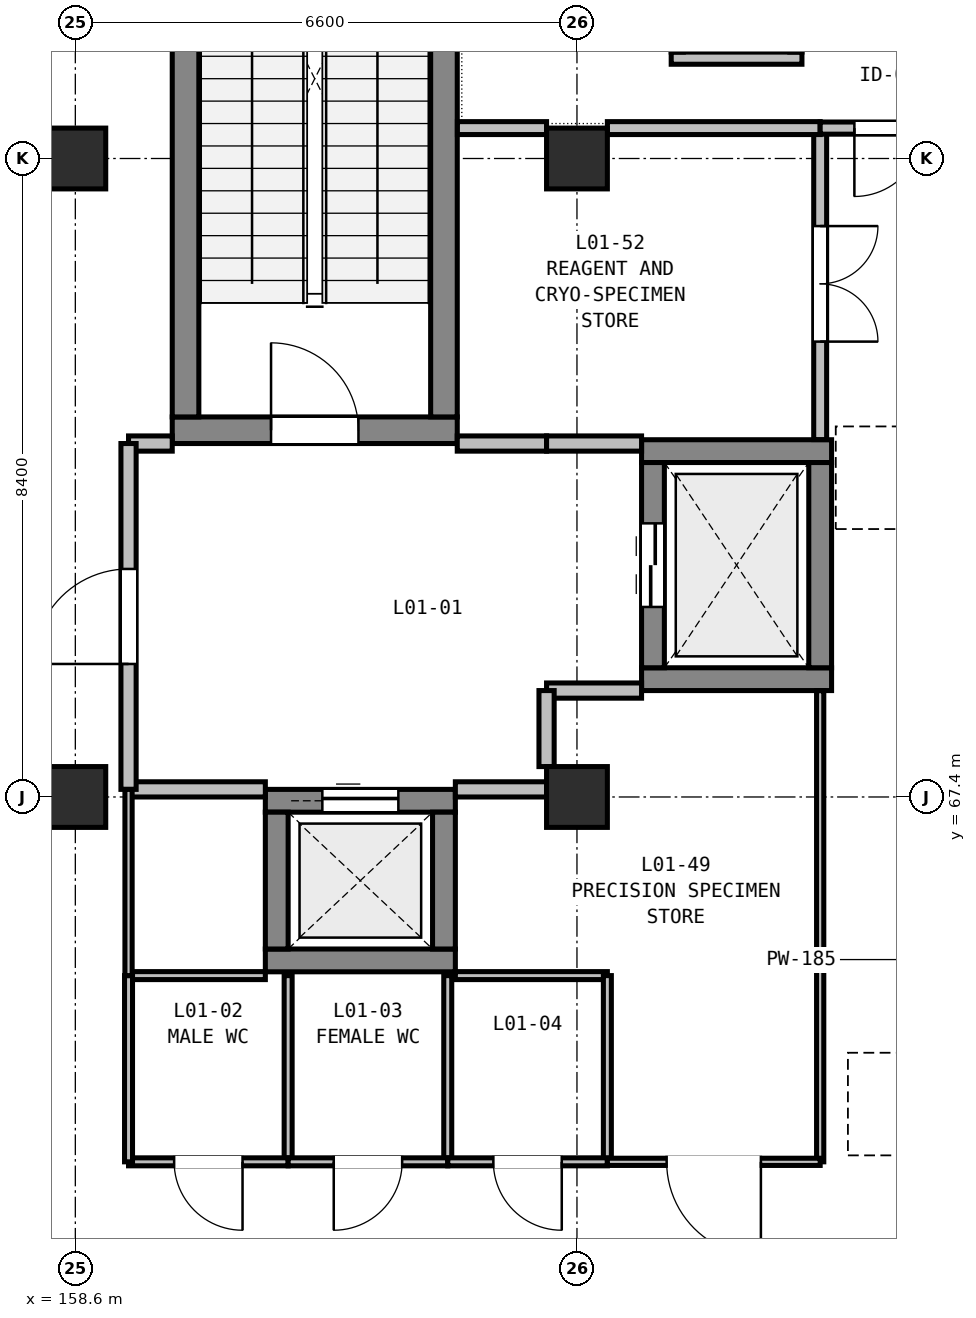
"""IFC4 building model, lengths in metres.
Left out: names, types, materials, properties, quantities, classifications, styles, units other than length and angle.
Written with IfcOpenShell. Run it as: python <this file> out.ifc"""

import sys

from ifc_helpers import new_model, si_unit, direction, frame, frame_2d, origin, origin_2d, place, context, subcontext, project, spatial, rectangle, extrude, element, fill, save


model = new_model("IFC4")
c1 = context("Model", 3, precision=1e-05, world=origin(), true_north=direction((0.0, 1.0)))
c2 = subcontext(c1, "Body", "Model", "MODEL_VIEW")
j1 = project(units=[si_unit("LENGTHUNIT", "METRE"), si_unit("PLANEANGLEUNIT", "RADIAN")], contexts=[c1])
p1 = place(None, origin())
s1 = spatial("IfcSite", under=j1, at=p1, CompositionType="ELEMENT")
p2 = place(p1, origin())
s2 = spatial("IfcBuilding", under=s1, at=p2, CompositionType="ELEMENT")
p3 = place(p2, frame((0.0, 0.0, 5.4)))
s3 = spatial("IfcBuildingStorey", under=s2, at=p3, CompositionType="ELEMENT", Elevation=5.4)
for number, where, z_axis, x_axis in (
    (1, (158.6, 67.4, 0.0), (0.0, 0.0, 1.0), (1.0, 0.0, 0.0)),
    (2, (158.6, 75.8, 0.0), (0.0, 0.0, 1.0), (1.0, 0.0, 0.0)),
    (3, (165.2, 67.4, 0.0), (0.0, 0.0, 1.0), (1.0, 0.0, 0.0)),
    (4, (165.2, 75.8, 0.0), (0.0, 0.0, 1.0), (1.0, 0.0, 0.0)),
):
    element("IfcColumn", number, at=place(p3, frame(where, z_axis=z_axis, x_axis=x_axis)), inside=s3, PredefinedType="COLUMN", context=c2, shape_type="SweptSolid", body=[
        extrude(rectangle(XDim=0.8, YDim=0.8, at=origin_2d()), origin(), (0.0, 0.0, 1.0), 4.8),
    ])
p4 = place(p3, frame((159.875, 72.225, 0.0), z_axis=(0.0, 0.0, 1.0), x_axis=(1.0, 0.0, 0.0)))
e5 = element("IfcWall", 5, at=p4, inside=s3, PredefinedType="SHEAR", context=c2, shape_type="SweptSolid", body=[
    extrude(rectangle(XDim=3.75, YDim=0.35, at=frame_2d((1.875, 0.0))), origin(), (0.0, 0.0, 1.0), 4.8),
])
p5 = place(p4, frame((1.3, 0.0, 0.0)))
e6 = element("IfcOpeningElement", 6, at=p5, cuts=e5, PredefinedType="OPENING", context=c2, shape_type="SweptSolid", body=[
    extrude(rectangle(XDim=1.15, YDim=2.15, at=frame_2d((0.575, 1.075))), frame((0.0, 0.185, 0.0), z_axis=(0.0, -1.0, 0.0), x_axis=(1.0, 0.0, 0.0)), (0.0, 0.0, 1.0), 0.37),
])
for number, where, z_axis, x_axis in (
    (7, (160.05, 72.4, 0.0), (0.0, 0.0, 1.0), (0.0, 1.0, 0.0)),
    (8, (163.45, 72.4, 0.0), (0.0, 0.0, 1.0), (0.0, 1.0, 0.0)),
):
    element("IfcWall", number, at=place(p3, frame(where, z_axis=z_axis, x_axis=x_axis)), inside=s3, PredefinedType="SHEAR", context=c2, shape_type="SweptSolid", body=[
        extrude(rectangle(XDim=7.375, YDim=0.35, at=frame_2d((3.688, 0.0))), origin(), (0.0, 0.0, 1.0), 4.8),
    ])
for number, where, z_axis, x_axis in (
    (9, (166.05, 68.95, 0.0), (0.0, 0.0, 1.0), (1.0, 0.0, 0.0)),
    (10, (166.05, 71.95, 0.0), (0.0, 0.0, 1.0), (1.0, 0.0, 0.0)),
):
    element("IfcWall", number, at=place(p3, frame(where, z_axis=z_axis, x_axis=x_axis)), inside=s3, PredefinedType="SHEAR", context=c2, shape_type="SweptSolid", body=[
        extrude(rectangle(XDim=2.5, YDim=0.3, at=frame_2d((1.25, 0.0))), origin(), (0.0, 0.0, 1.0), 4.8),
    ])
p6 = place(p3, frame((166.2, 69.1, 0.0), z_axis=(0.0, 0.0, 1.0), x_axis=(0.0, 1.0, 0.0)))
e11 = element("IfcWall", 11, at=p6, inside=s3, PredefinedType="SHEAR", context=c2, shape_type="SweptSolid", body=[
    extrude(rectangle(XDim=2.7, YDim=0.3, at=frame_2d((1.35, 0.0))), origin(), (0.0, 0.0, 1.0), 4.8),
])
p7 = place(p6, frame((0.8, 0.0, 0.0)))
e12 = element("IfcOpeningElement", 12, at=p7, cuts=e11, PredefinedType="OPENING", context=c2, shape_type="SweptSolid", body=[
    extrude(rectangle(XDim=1.1, YDim=2.1, at=frame_2d((0.55, 1.05))), frame((0.0, 0.16, 0.0), z_axis=(0.0, -1.0, 0.0), x_axis=(1.0, 0.0, 0.0)), (0.0, 0.0, 1.0), 0.32),
])
p8 = place(p3, frame((168.4, 69.1, 0.0), z_axis=(0.0, 0.0, 1.0), x_axis=(0.0, 1.0, 0.0)))
e13 = element("IfcWall", 13, at=p8, inside=s3, PredefinedType="SHEAR", context=c2, shape_type="SweptSolid", body=[
    extrude(rectangle(XDim=2.7, YDim=0.3, at=frame_2d((1.35, 0.0))), origin(), (0.0, 0.0, 1.0), 4.8),
])
p9 = place(p3, frame((161.1, 65.25, 0.0), z_axis=(0.0, 0.0, 1.0), x_axis=(1.0, 0.0, 0.0)))
e14 = element("IfcWall", 14, at=p9, inside=s3, PredefinedType="SHEAR", context=c2, shape_type="SweptSolid", body=[
    extrude(rectangle(XDim=2.5, YDim=0.3, at=frame_2d((1.25, 0.0))), origin(), (0.0, 0.0, 1.0), 4.8),
])
p10 = place(p3, frame((161.1, 67.35, 0.0), z_axis=(0.0, 0.0, 1.0), x_axis=(1.0, 0.0, 0.0)))
e15 = element("IfcWall", 15, at=p10, inside=s3, PredefinedType="SHEAR", context=c2, shape_type="SweptSolid", body=[
    extrude(rectangle(XDim=2.5, YDim=0.3, at=frame_2d((1.25, 0.0))), origin(), (0.0, 0.0, 1.0), 4.8),
])
p11 = place(p10, frame((0.75, 0.0, 0.0)))
e16 = element("IfcOpeningElement", 16, at=p11, cuts=e15, PredefinedType="OPENING", context=c2, shape_type="SweptSolid", body=[
    extrude(rectangle(XDim=1.0, YDim=2.1, at=frame_2d((0.5, 1.05))), frame((0.0, 0.16, 0.0), z_axis=(0.0, -1.0, 0.0), x_axis=(1.0, 0.0, 0.0)), (0.0, 0.0, 1.0), 0.32),
])
for number, where, z_axis, x_axis in (
    (17, (161.25, 65.4, 0.0), (0.0, 0.0, 1.0), (0.0, 1.0, 0.0)),
    (18, (163.45, 65.4, 0.0), (0.0, 0.0, 1.0), (0.0, 1.0, 0.0)),
):
    element("IfcWall", number, at=place(p3, frame(where, z_axis=z_axis, x_axis=x_axis)), inside=s3, PredefinedType="SHEAR", context=c2, shape_type="SweptSolid", body=[
        extrude(rectangle(XDim=1.8, YDim=0.3, at=frame_2d((0.9, 0.0))), origin(), (0.0, 0.0, 1.0), 4.8),
    ])
p12 = place(p3, frame((166.44, 77.12, 0.0), z_axis=(0.0, 0.0, 1.0), x_axis=(1.0, 0.0, 0.0)))
e19 = element("IfcWall", 19, at=p12, inside=s3, PredefinedType="PARTITIONING", context=c2, shape_type="SweptSolid", body=[
    extrude(rectangle(XDim=1.72, YDim=0.16, at=frame_2d((0.86, 0.0))), origin(), (0.0, 0.0, 1.0), 4.445),
])
p13 = place(p3, frame((159.3, 72.05, 0.0), z_axis=(0.0, 0.0, 1.0), x_axis=(1.0, 0.0, 0.0)))
e20 = element("IfcWall", 20, at=p13, inside=s3, PredefinedType="PARTITIONING", context=c2, shape_type="SweptSolid", body=[
    extrude(rectangle(XDim=0.575, YDim=0.2, at=frame_2d((0.288, 0.0))), origin(), (0.0, 0.0, 1.0), 4.445),
])
p14 = place(p3, frame((163.625, 72.05, 0.0), z_axis=(0.0, 0.0, 1.0), x_axis=(1.0, 0.0, 0.0)))
e21 = element("IfcWall", 21, at=p14, inside=s3, PredefinedType="PARTITIONING", context=c2, shape_type="SweptSolid", body=[
    extrude(rectangle(XDim=1.175, YDim=0.2, at=frame_2d((0.587, 0.0))), origin(), (0.0, 0.0, 1.0), 4.445),
])
for number, where, z_axis, x_axis in (
    (22, (164.8, 72.05, 0.0), (0.0, 0.0, 1.0), (1.0, 0.0, 0.0)),
    (23, (166.05, 68.8, 0.0), (0.0, 0.0, 1.0), (-1.0, 0.0, 0.0)),
):
    element("IfcWall", number, at=place(p3, frame(where, z_axis=z_axis, x_axis=x_axis)), inside=s3, PredefinedType="PARTITIONING", context=c2, shape_type="SweptSolid", body=[
        extrude(rectangle(XDim=1.25, YDim=0.2, at=frame_2d((0.625, 0.0))), origin(), (0.0, 0.0, 1.0), 3.935),
    ])
p15 = place(p3, frame((164.8, 68.8, 0.0), z_axis=(0.0, 0.0, 1.0), x_axis=(0.0, -1.0, 0.0)))
e24 = element("IfcWall", 24, at=p15, inside=s3, PredefinedType="PARTITIONING", context=c2, shape_type="SweptSolid", body=[
    extrude(rectangle(XDim=1.0, YDim=0.2, at=frame_2d((0.5, 0.0))), origin(), (0.0, 0.0, 1.0), 4.445),
])
p16 = place(p3, frame((164.8, 67.5, 0.0), z_axis=(0.0, 0.0, 1.0), x_axis=(-1.0, 0.0, 0.0)))
e25 = element("IfcWall", 25, at=p16, inside=s3, PredefinedType="PARTITIONING", context=c2, shape_type="SweptSolid", body=[
    extrude(rectangle(XDim=1.2, YDim=0.2, at=frame_2d((0.6, 0.0))), origin(), (0.0, 0.0, 1.0), 4.135),
])
p17 = place(p3, frame((161.1, 67.5, 0.0), z_axis=(0.0, 0.0, 1.0), x_axis=(-1.0, 0.0, 0.0)))
e26 = element("IfcWall", 26, at=p17, inside=s3, PredefinedType="PARTITIONING", context=c2, shape_type="SweptSolid", body=[
    extrude(rectangle(XDim=1.8, YDim=0.2, at=frame_2d((0.9, 0.0))), origin(), (0.0, 0.0, 1.0), 4.135),
])
p18 = place(p3, frame((159.3, 67.5, 0.0), z_axis=(0.0, 0.0, 1.0), x_axis=(0.0, 1.0, 0.0)))
e27 = element("IfcWall", 27, at=p18, inside=s3, PredefinedType="PARTITIONING", context=c2, shape_type="SweptSolid", body=[
    extrude(rectangle(XDim=4.55, YDim=0.2, at=frame_2d((2.275, 0.0))), origin(), (0.0, 0.0, 1.0), 4.135),
])
p19 = place(p18, frame((1.65, 0.0, 0.0)))
e28 = element("IfcOpeningElement", 28, at=p19, cuts=e27, PredefinedType="OPENING", context=c2, shape_type="SweptSolid", body=[
    extrude(rectangle(XDim=1.25, YDim=2.15, at=frame_2d((0.625, 1.075))), frame((0.0, 0.11, 0.0), z_axis=(0.0, -1.0, 0.0), x_axis=(1.0, 0.0, 0.0)), (0.0, 0.0, 1.0), 0.22),
])
p20 = place(p3, frame((159.3, 65.05, 0.0), z_axis=(0.0, 0.0, 1.0), x_axis=(1.0, 0.0, 0.0)))
e29 = element("IfcWall", 29, at=p20, inside=s3, PredefinedType="PARTITIONING", context=c2, shape_type="SweptSolid", body=[
    extrude(rectangle(XDim=1.8, YDim=0.105, at=frame_2d((0.9, 0.0))), origin(), (0.0, 0.0, 1.0), 4.445),
])
p21 = place(p3, frame((161.4, 65.05, 0.0), z_axis=(0.0, 0.0, 1.0), x_axis=(0.0, -1.0, 0.0)))
e30 = element("IfcWall", 30, at=p21, inside=s3, PredefinedType="PARTITIONING", context=c2, shape_type="SweptSolid", body=[
    extrude(rectangle(XDim=2.45, YDim=0.105, at=frame_2d((1.225, 0.0))), origin(), (0.0, 0.0, 1.0), 4.445),
])
p22 = place(p3, frame((161.4, 62.6, 0.0), z_axis=(0.0, 0.0, 1.0), x_axis=(-1.0, 0.0, 0.0)))
e31 = element("IfcWall", 31, at=p22, inside=s3, PredefinedType="PARTITIONING", context=c2, shape_type="SweptSolid", body=[
    extrude(rectangle(XDim=2.1, YDim=0.105, at=frame_2d((1.05, 0.0))), origin(), (0.0, 0.0, 1.0), 4.445),
])
p23 = place(p22, frame((0.6, 0.0, 0.0)))
e32 = element("IfcOpeningElement", 32, at=p23, cuts=e31, PredefinedType="OPENING", context=c2, shape_type="SweptSolid", body=[
    extrude(rectangle(XDim=0.9, YDim=2.02, at=frame_2d((0.45, 1.01))), frame((0.0, 0.062, 0.0), z_axis=(0.0, -1.0, 0.0), x_axis=(1.0, 0.0, 0.0)), (0.0, 0.0, 1.0), 0.125),
])
for number, where, z_axis, x_axis in (
    (33, (159.3, 62.6, 0.0), (0.0, 0.0, 1.0), (0.0, 1.0, 0.0)),
    (34, (163.5, 65.05, 0.0), (0.0, 0.0, 1.0), (0.0, -1.0, 0.0)),
):
    element("IfcWall", number, at=place(p3, frame(where, z_axis=z_axis, x_axis=x_axis)), inside=s3, PredefinedType="PARTITIONING", context=c2, shape_type="SweptSolid", body=[
        extrude(rectangle(XDim=2.45, YDim=0.105, at=frame_2d((1.225, 0.0))), origin(), (0.0, 0.0, 1.0), 4.445),
    ])
p24 = place(p3, frame((163.5, 62.6, 0.0), z_axis=(0.0, 0.0, 1.0), x_axis=(-1.0, 0.0, 0.0)))
e35 = element("IfcWall", 35, at=p24, inside=s3, PredefinedType="PARTITIONING", context=c2, shape_type="SweptSolid", body=[
    extrude(rectangle(XDim=2.1, YDim=0.105, at=frame_2d((1.05, 0.0))), origin(), (0.0, 0.0, 1.0), 4.445),
])
p25 = place(p24, frame((0.6, 0.0, 0.0)))
e36 = element("IfcOpeningElement", 36, at=p25, cuts=e35, PredefinedType="OPENING", context=c2, shape_type="SweptSolid", body=[
    extrude(rectangle(XDim=0.9, YDim=2.02, at=frame_2d((0.45, 1.01))), frame((0.0, 0.062, 0.0), z_axis=(0.0, -1.0, 0.0), x_axis=(1.0, 0.0, 0.0)), (0.0, 0.0, 1.0), 0.125),
])
p26 = place(p3, frame((163.6, 65.05, 0.0), z_axis=(0.0, 0.0, 1.0), x_axis=(1.0, 0.0, 0.0)))
e37 = element("IfcWall", 37, at=p26, inside=s3, PredefinedType="PARTITIONING", context=c2, shape_type="SweptSolid", body=[
    extrude(rectangle(XDim=2.0, YDim=0.105, at=frame_2d((1.0, 0.0))), origin(), (0.0, 0.0, 1.0), 3.935),
])
p27 = place(p3, frame((165.6, 65.05, 0.0), z_axis=(0.0, 0.0, 1.0), x_axis=(0.0, -1.0, 0.0)))
e38 = element("IfcWall", 38, at=p27, inside=s3, PredefinedType="PARTITIONING", context=c2, shape_type="SweptSolid", body=[
    extrude(rectangle(XDim=2.45, YDim=0.105, at=frame_2d((1.225, 0.0))), origin(), (0.0, 0.0, 1.0), 4.445),
])
p28 = place(p3, frame((165.6, 62.6, 0.0), z_axis=(0.0, 0.0, 1.0), x_axis=(-1.0, 0.0, 0.0)))
e39 = element("IfcWall", 39, at=p28, inside=s3, PredefinedType="PARTITIONING", context=c2, shape_type="SweptSolid", body=[
    extrude(rectangle(XDim=2.1, YDim=0.105, at=frame_2d((1.05, 0.0))), origin(), (0.0, 0.0, 1.0), 3.935),
])
p29 = place(p28, frame((0.6, 0.0, 0.0)))
e40 = element("IfcOpeningElement", 40, at=p29, cuts=e39, PredefinedType="OPENING", context=c2, shape_type="SweptSolid", body=[
    extrude(rectangle(XDim=0.9, YDim=2.02, at=frame_2d((0.45, 1.01))), frame((0.0, 0.062, 0.0), z_axis=(0.0, -1.0, 0.0), x_axis=(1.0, 0.0, 0.0)), (0.0, 0.0, 1.0), 0.125),
])
p30 = place(p3, frame((168.4, 68.798, 0.0), z_axis=(0.0, 0.0, 1.0), x_axis=(0.0, -1.0, 0.0)))
e41 = element("IfcWall", 41, at=p30, inside=s3, PredefinedType="PARTITIONING", context=c2, shape_type="SweptSolid", body=[
    extrude(rectangle(XDim=6.198, YDim=0.095, at=frame_2d((3.099, 0.0))), origin(), (0.0, 0.0, 1.0), 4.135),
])
p31 = place(p3, frame((168.4, 62.6, 0.0), z_axis=(0.0, 0.0, 1.0), x_axis=(-1.0, 0.0, 0.0)))
e42 = element("IfcWall", 42, at=p31, inside=s3, PredefinedType="PARTITIONING", context=c2, shape_type="SweptSolid", body=[
    extrude(rectangle(XDim=2.8, YDim=0.095, at=frame_2d((1.4, 0.0))), origin(), (0.0, 0.0, 1.0), 4.285),
])
p32 = place(p31, frame((0.78, 0.0, 0.0)))
e43 = element("IfcOpeningElement", 43, at=p32, cuts=e42, PredefinedType="OPENING", context=c2, shape_type="SweptSolid", body=[
    extrude(rectangle(XDim=1.24, YDim=2.14, at=frame_2d((0.62, 1.07))), frame((0.0, 0.057, 0.0), z_axis=(0.0, -1.0, 0.0), x_axis=(1.0, 0.0, 0.0)), (0.0, 0.0, 1.0), 0.115),
])
p33 = place(p3, frame((159.3, 65.05, 0.0), z_axis=(0.0, 0.0, 1.0), x_axis=(0.0, 1.0, 0.0)))
e44 = element("IfcWall", 44, at=p33, inside=s3, PredefinedType="PARTITIONING", context=c2, shape_type="SweptSolid", body=[
    extrude(rectangle(XDim=2.45, YDim=0.095, at=frame_2d((1.225, 0.0))), origin(), (0.0, 0.0, 1.0), 4.135),
])
p34 = place(p3, frame((168.4, 76.2, 0.0), z_axis=(0.0, 0.0, 1.0), x_axis=(0.0, -1.0, 0.0)))
e45 = element("IfcWall", 45, at=p34, inside=s3, PredefinedType="PARTITIONING", context=c2, shape_type="SweptSolid", body=[
    extrude(rectangle(XDim=4.098, YDim=0.17, at=frame_2d((2.049, 0.0))), origin(), (0.0, 0.0, 1.0), 4.135),
])
p35 = place(p34, frame((1.289, 0.0, 0.0)))
e46 = element("IfcOpeningElement", 46, at=p35, cuts=e45, PredefinedType="OPENING", context=c2, shape_type="SweptSolid", body=[
    extrude(rectangle(XDim=1.52, YDim=2.14, at=frame_2d((0.76, 1.07))), frame((0.0, 0.095, 0.0), z_axis=(0.0, -1.0, 0.0), x_axis=(1.0, 0.0, 0.0)), (0.0, 0.0, 1.0), 0.19),
])
p36 = place(p3, frame((163.627, 76.2, 0.0), z_axis=(0.0, 0.0, 1.0), x_axis=(1.0, 0.0, 0.0)))
e47 = element("IfcWall", 47, at=p36, inside=s3, PredefinedType="PARTITIONING", context=c2, shape_type="SweptSolid", body=[
    extrude(rectangle(XDim=1.173, YDim=0.17, at=frame_2d((0.586, 0.0))), origin(), (0.0, 0.0, 1.0), 4.445),
])
p37 = place(p3, frame((165.6, 76.2, 0.0), z_axis=(0.0, 0.0, 1.0), x_axis=(1.0, 0.0, 0.0)))
e48 = element("IfcWall", 48, at=p37, inside=s3, PredefinedType="PARTITIONING", context=c2, shape_type="SweptSolid", body=[
    extrude(rectangle(XDim=2.8, YDim=0.17, at=frame_2d((1.4, 0.0))), origin(), (0.0, 0.0, 1.0), 4.285),
])
p38 = place(p3, frame((170.2, 76.2, 0.0), z_axis=(0.0, 0.0, 1.0), x_axis=(-1.0, 0.0, 0.0)))
e49 = element("IfcWall", 49, at=p38, inside=s3, PredefinedType="PARTITIONING", context=c2, shape_type="SweptSolid", body=[
    extrude(rectangle(XDim=1.8, YDim=0.16, at=frame_2d((0.9, 0.0))), origin(), (0.0, 0.0, 1.0), 4.285),
])
p39 = place(p38, frame((0.45, 0.0, 0.0)))
e50 = element("IfcOpeningElement", 50, at=p39, cuts=e49, PredefinedType="OPENING", context=c2, shape_type="SweptSolid", body=[
    extrude(rectangle(XDim=0.9, YDim=2.02, at=frame_2d((0.45, 1.01))), frame((0.0, 0.09, 0.0), z_axis=(0.0, -1.0, 0.0), x_axis=(1.0, 0.0, 0.0)), (0.0, 0.0, 1.0), 0.18),
])
p40 = place(p5, origin())
e51 = element("IfcDoor", 51, at=p40, inside=s3, OperationType="SINGLE_SWING_LEFT", PredefinedType="DOOR", context=c2, shape_type="SweptSolid", body=[
    extrude(rectangle(XDim=1.15, YDim=2.15, at=frame_2d((0.575, 1.075))), frame((0.0, 0.025, 0.0), z_axis=(0.0, -1.0, 0.0), x_axis=(1.0, 0.0, 0.0)), (0.0, 0.0, 1.0), 0.05),
])
fill(e6, e51)
p41 = place(p7, origin())
e52 = element("IfcDoor", 52, at=p41, inside=s3, OperationType="DOUBLE_DOOR_SLIDING", PredefinedType="DOOR", context=c2, shape_type="SweptSolid", body=[
    extrude(rectangle(XDim=1.1, YDim=2.1, at=frame_2d((0.55, 1.05))), frame((0.0, 0.025, 0.0), z_axis=(0.0, -1.0, 0.0), x_axis=(1.0, 0.0, 0.0)), (0.0, 0.0, 1.0), 0.05),
])
fill(e12, e52)
p42 = place(p11, origin())
e53 = element("IfcDoor", 53, at=p42, inside=s3, OperationType="SLIDING_TO_LEFT", PredefinedType="DOOR", context=c2, shape_type="SweptSolid", body=[
    extrude(rectangle(XDim=1.0, YDim=2.1, at=frame_2d((0.5, 1.05))), frame((0.0, 0.025, 0.0), z_axis=(0.0, -1.0, 0.0), x_axis=(1.0, 0.0, 0.0)), (0.0, 0.0, 1.0), 0.05),
])
fill(e16, e53)
p43 = place(p19, origin())
e54 = element("IfcDoor", 54, at=p43, inside=s3, OperationType="SINGLE_SWING_LEFT", PredefinedType="DOOR", context=c2, shape_type="SweptSolid", body=[
    extrude(rectangle(XDim=1.25, YDim=2.15, at=frame_2d((0.625, 1.075))), frame((0.0, 0.025, 0.0), z_axis=(0.0, -1.0, 0.0), x_axis=(1.0, 0.0, 0.0)), (0.0, 0.0, 1.0), 0.05),
])
fill(e28, e54)
p44 = place(p23, origin())
e55 = element("IfcDoor", 55, at=p44, inside=s3, OperationType="SINGLE_SWING_LEFT", PredefinedType="DOOR", context=c2, shape_type="SweptSolid", body=[
    extrude(rectangle(XDim=0.9, YDim=2.02, at=frame_2d((0.45, 1.01))), frame((0.0, 0.025, 0.0), z_axis=(0.0, -1.0, 0.0), x_axis=(1.0, 0.0, 0.0)), (0.0, 0.0, 1.0), 0.05),
])
fill(e32, e55)
p45 = place(p25, origin())
e56 = element("IfcDoor", 56, at=p45, inside=s3, OperationType="SINGLE_SWING_RIGHT", PredefinedType="DOOR", context=c2, shape_type="SweptSolid", body=[
    extrude(rectangle(XDim=0.9, YDim=2.02, at=frame_2d((0.45, 1.01))), frame((0.0, 0.025, 0.0), z_axis=(0.0, -1.0, 0.0), x_axis=(1.0, 0.0, 0.0)), (0.0, 0.0, 1.0), 0.05),
])
fill(e36, e56)
p46 = place(p29, origin())
e57 = element("IfcDoor", 57, at=p46, inside=s3, OperationType="SINGLE_SWING_LEFT", PredefinedType="DOOR", context=c2, shape_type="SweptSolid", body=[
    extrude(rectangle(XDim=0.9, YDim=2.02, at=frame_2d((0.45, 1.01))), frame((0.0, 0.025, 0.0), z_axis=(0.0, -1.0, 0.0), x_axis=(1.0, 0.0, 0.0)), (0.0, 0.0, 1.0), 0.05),
])
fill(e40, e57)
p47 = place(p32, origin())
e58 = element("IfcDoor", 58, at=p47, inside=s3, OperationType="SINGLE_SWING_LEFT", PredefinedType="DOOR", context=c2, shape_type="SweptSolid", body=[
    extrude(rectangle(XDim=1.24, YDim=2.14, at=frame_2d((0.62, 1.07))), frame((0.0, 0.025, 0.0), z_axis=(0.0, -1.0, 0.0), x_axis=(1.0, 0.0, 0.0)), (0.0, 0.0, 1.0), 0.05),
])
fill(e43, e58)
p48 = place(p35, origin())
e59 = element("IfcDoor", 59, at=p48, inside=s3, OperationType="DOUBLE_DOOR_SINGLE_SWING", PredefinedType="DOOR", context=c2, shape_type="SweptSolid", body=[
    extrude(rectangle(XDim=1.52, YDim=2.14, at=frame_2d((0.76, 1.07))), frame((0.0, 0.025, 0.0), z_axis=(0.0, -1.0, 0.0), x_axis=(1.0, 0.0, 0.0)), (0.0, 0.0, 1.0), 0.05),
])
fill(e46, e59)
p49 = place(p39, origin())
e60 = element("IfcDoor", 60, at=p49, inside=s3, OperationType="SINGLE_SWING_RIGHT", PredefinedType="DOOR", context=c2, shape_type="SweptSolid", body=[
    extrude(rectangle(XDim=0.9, YDim=2.02, at=frame_2d((0.45, 1.01))), frame((0.0, 0.025, 0.0), z_axis=(0.0, -1.0, 0.0), x_axis=(1.0, 0.0, 0.0)), (0.0, 0.0, 1.0), 0.05),
])
fill(e50, e60)
save(model, sys.argv[1])
